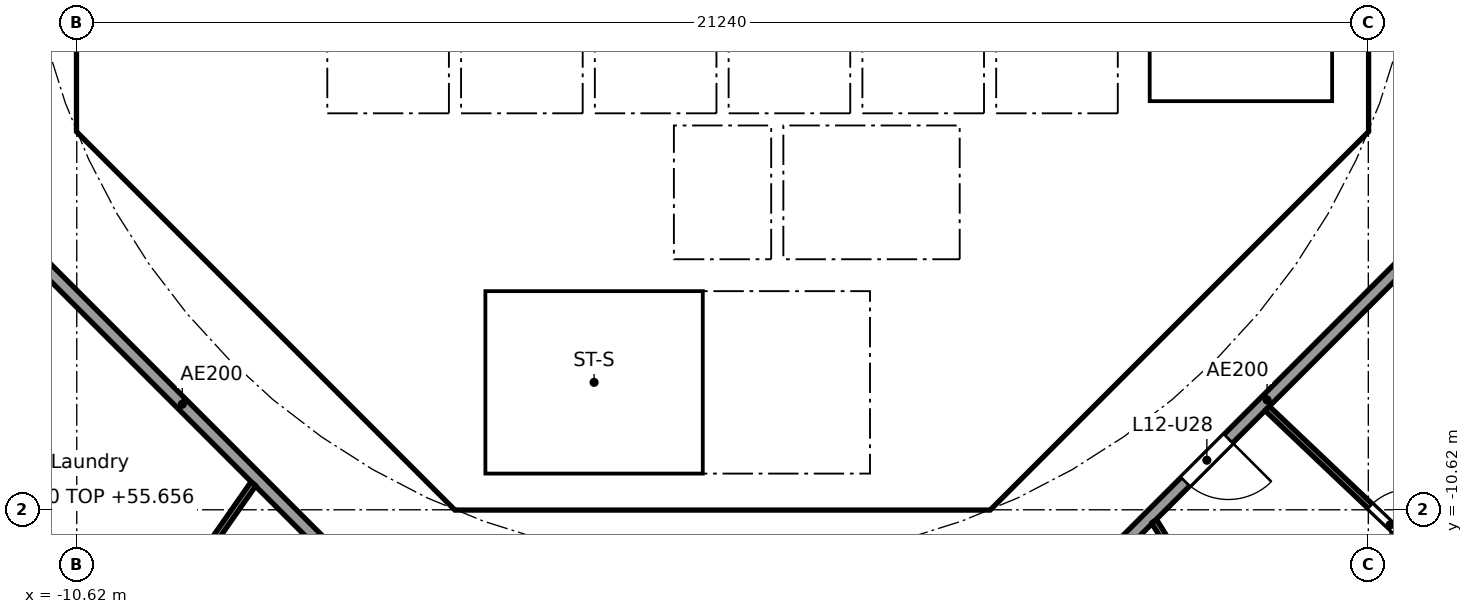
"""IFC4 building model, lengths in metres.
Left out: names, types, materials, properties, quantities, classifications, styles, units other than length and angle.
Written with IfcOpenShell. Run it as: python <this file> out.ifc"""

import sys

from ifc_helpers import new_model, si_unit, direction, frame, frame_2d, origin, place, context, subcontext, project, spatial, polyline, rectangle, outline, extrude, element, fill, save


model = new_model("IFC4")
c1 = context("Model", 3, precision=1e-05, world=origin(), true_north=direction((0.0, 1.0)))
c2 = subcontext(c1, "Body", "Model", "MODEL_VIEW")
j1 = project(units=[si_unit("LENGTHUNIT", "METRE"), si_unit("PLANEANGLEUNIT", "RADIAN")], contexts=[c1])
p1 = place(None, origin())
s1 = spatial("IfcSite", under=j1, at=p1, CompositionType="ELEMENT")
p2 = place(p1, origin())
s2 = spatial("IfcBuilding", under=s1, at=p2, CompositionType="ELEMENT")
p3 = place(p2, frame((0.0, 0.0, 52.9)))
s3 = spatial("IfcBuildingStorey", under=s2, at=p3, CompositionType="ELEMENT", Elevation=52.9)
p4 = place(p3, frame((-10.325, 3.801, 0.0), z_axis=(0.0, 0.0, 1.0), x_axis=(0.0, -1.0, 0.0)))
e1 = element("IfcWall", 1, at=p4, inside=s3, PredefinedType="SHEAR", context=c2, shape_type="SweptSolid", body=[
    extrude(rectangle(XDim=7.602, YDim=0.6, at=frame_2d((3.801, 0.0))), origin(), (0.0, 0.0, 1.0), 3.44),
])
p5 = place(p4, frame((0.651, 0.0, 0.0)))
e2 = element("IfcOpeningElement", 2, at=p5, cuts=e1, PredefinedType="OPENING", context=c2, shape_type="SweptSolid", body=[
    extrude(rectangle(XDim=1.5, YDim=2.1, at=frame_2d((0.75, 1.05))), frame((0.0, 0.31, 0.0), z_axis=(0.0, -1.0, 0.0), x_axis=(1.0, 0.0, 0.0)), (0.0, 0.0, 1.0), 0.62),
])
p6 = place(p4, frame((5.451, 0.0, 0.0)))
e3 = element("IfcOpeningElement", 3, at=p6, cuts=e1, PredefinedType="OPENING", context=c2, shape_type="SweptSolid", body=[
    extrude(rectangle(XDim=1.5, YDim=2.1, at=frame_2d((0.75, 1.05))), frame((0.0, 0.31, 0.0), z_axis=(0.0, -1.0, 0.0), x_axis=(1.0, 0.0, 0.0)), (0.0, 0.0, 1.0), 0.62),
])
p7 = place(p3, frame((-9.988, -4.613, 0.0), z_axis=(0.0, 0.0, 1.0), x_axis=(0.707106781187, -0.707106781187, 0.0)))
e4 = element("IfcWall", 4, at=p7, inside=s3, PredefinedType="SHEAR", context=c2, shape_type="SweptSolid", body=[
    extrude(rectangle(XDim=7.602, YDim=0.6, at=frame_2d((3.801, 0.0))), origin(), (0.0, 0.0, 1.0), 3.44),
])
p8 = place(p7, frame((6.151, 0.0, 0.0)))
e5 = element("IfcOpeningElement", 5, at=p8, cuts=e4, PredefinedType="OPENING", context=c2, shape_type="SweptSolid", body=[
    extrude(rectangle(XDim=1.1, YDim=2.1, at=frame_2d((0.55, 1.05))), frame((0.0, 0.31, 0.0), z_axis=(0.0, -1.0, 0.0), x_axis=(1.0, 0.0, 0.0)), (0.0, 0.0, 1.0), 0.62),
])
p9 = place(p3, frame((4.613, -9.988, 0.0), z_axis=(0.0, 0.0, 1.0), x_axis=(0.707106781187, 0.707106781187, 0.0)))
e6 = element("IfcWall", 6, at=p9, inside=s3, PredefinedType="SHEAR", context=c2, shape_type="SweptSolid", body=[
    extrude(rectangle(XDim=7.602, YDim=0.6, at=frame_2d((3.801, 0.0))), origin(), (0.0, 0.0, 1.0), 3.44),
])
p10 = place(p9, frame((3.201, 0.0, 0.0)))
e7 = element("IfcOpeningElement", 7, at=p10, cuts=e6, PredefinedType="OPENING", context=c2, shape_type="SweptSolid", body=[
    extrude(rectangle(XDim=1.2, YDim=2.1, at=frame_2d((0.6, 1.05))), frame((0.0, 0.31, 0.0), z_axis=(0.0, -1.0, 0.0), x_axis=(1.0, 0.0, 0.0)), (0.0, 0.0, 1.0), 0.62),
])
p11 = place(p3, frame((4.0, -10.025, 0.0), z_axis=(0.0, 0.0, 1.0), x_axis=(0.0, 1.0, 0.0)))
e8 = element("IfcWall", 8, at=p11, inside=s3, PredefinedType="SOLIDWALL", context=c2, shape_type="SweptSolid", body=[
    extrude(rectangle(XDim=3.0, YDim=0.2, at=frame_2d((1.5, 0.0))), origin(), (0.0, 0.0, 1.0), 3.44),
])
p12 = place(p11, frame((0.975, 0.0, 0.0)))
e9 = element("IfcOpeningElement", 9, at=p12, cuts=e8, PredefinedType="OPENING", context=c2, shape_type="SweptSolid", body=[
    extrude(rectangle(XDim=1.1, YDim=2.1, at=frame_2d((0.55, 1.05))), frame((0.0, 0.11, 0.0), z_axis=(0.0, -1.0, 0.0), x_axis=(1.0, 0.0, 0.0)), (0.0, 0.0, 1.0), 0.22),
])
p13 = place(p3, frame((-6.2, -7.827, 0.0), z_axis=(0.0, 0.0, 1.0), x_axis=(0.0, 1.0, 0.0)))
e10 = element("IfcWall", 10, at=p13, inside=s3, PredefinedType="PARTITIONING", context=c2, shape_type="SweptSolid", body=[
    extrude(rectangle(XDim=3.527, YDim=0.15, at=frame_2d((1.763, 0.0))), origin(), (0.0, 0.0, 1.0), 3.44),
])
p14 = place(p13, frame((1.276, 0.0, 0.0)))
e11 = element("IfcOpeningElement", 11, at=p14, cuts=e10, PredefinedType="OPENING", context=c2, shape_type="SweptSolid", body=[
    extrude(rectangle(XDim=0.9, YDim=2.1, at=frame_2d((0.45, 1.05))), frame((0.0, 0.085, 0.0), z_axis=(0.0, -1.0, 0.0), x_axis=(1.0, 0.0, 0.0)), (0.0, 0.0, 1.0), 0.17),
])
p15 = place(p3, frame((4.0, -6.5, 0.0), z_axis=(0.0, 0.0, 1.0), x_axis=(0.0, 1.0, 0.0)))
e12 = element("IfcWall", 12, at=p15, inside=s3, PredefinedType="SOLIDWALL", context=c2, shape_type="SweptSolid", body=[
    extrude(rectangle(XDim=2.2, YDim=0.2, at=frame_2d((1.1, 0.0))), origin(), (0.0, 0.0, 1.0), 3.44),
])
p16 = place(p15, frame((0.55, 0.0, 0.0)))
e13 = element("IfcOpeningElement", 13, at=p16, cuts=e12, PredefinedType="OPENING", context=c2, shape_type="SweptSolid", body=[
    extrude(rectangle(XDim=1.1, YDim=2.1, at=frame_2d((0.55, 1.05))), frame((0.0, 0.11, 0.0), z_axis=(0.0, -1.0, 0.0), x_axis=(1.0, 0.0, 0.0)), (0.0, 0.0, 1.0), 0.22),
])
p17 = place(p3, frame((-4.0, -6.5, 0.0), z_axis=(0.0, 0.0, 1.0), x_axis=(0.0, 1.0, 0.0)))
e14 = element("IfcWall", 14, at=p17, inside=s3, PredefinedType="SOLIDWALL", context=c2, shape_type="SweptSolid", body=[
    extrude(rectangle(XDim=2.2, YDim=0.2, at=frame_2d((1.1, 0.0))), origin(), (0.0, 0.0, 1.0), 3.44),
])
p18 = place(p17, frame((0.65, 0.0, 0.0)))
e15 = element("IfcOpeningElement", 15, at=p18, cuts=e14, PredefinedType="OPENING", context=c2, shape_type="SweptSolid", body=[
    extrude(rectangle(XDim=0.9, YDim=2.1, at=frame_2d((0.45, 1.05))), frame((0.0, 0.11, 0.0), z_axis=(0.0, -1.0, 0.0), x_axis=(1.0, 0.0, 0.0)), (0.0, 0.0, 1.0), 0.22),
])
p19 = place(p3, origin())
e16 = element("IfcWall", 16, at=p19, inside=s3, PredefinedType="SHEAR", context=c2, shape_type="SweptSolid", body=[
    extrude(outline(polyline([(-10.625, -3.801), (-10.025, -3.801), (-10.025, -4.152), (-9.776, -4.401), (-10.2, -4.825), (-10.625, -4.401), (-10.625, -3.801)])), origin(), (0.0, 0.0, 1.0), 3.44),
])
p20 = place(p3, origin())
e17 = element("IfcWall", 17, at=p20, inside=s3, PredefinedType="SHEAR", context=c2, shape_type="SweptSolid", body=[
    extrude(outline(polyline([(-4.152, -10.025), (4.152, -10.025), (4.401, -9.776), (4.825, -10.2), (4.401, -10.625), (-4.401, -10.625), (-4.825, -10.2), (-4.401, -9.776), (-4.152, -10.025)])), origin(), (0.0, 0.0, 1.0), 3.44),
])
p21 = place(p3, origin())
e18 = element("IfcWall", 18, at=p21, inside=s3, PredefinedType="SHEAR", context=c2, shape_type="SweptSolid", body=[
    extrude(outline(polyline([(9.776, -4.401), (10.025, -4.152), (10.025, -3.801), (10.025, 4.152), (9.776, 4.401), (10.2, 4.825), (10.625, 4.401), (10.625, -4.401), (10.2, -4.825), (9.776, -4.401)])), origin(), (0.0, 0.0, 1.0), 3.44),
])
for number, where, z_axis, x_axis in (
    (19, (-0.9, -6.5, 0.0), (0.0, 0.0, 1.0), (0.0, 1.0, 0.0)),
    (20, (0.9, -6.5, 0.0), (0.0, 0.0, 1.0), (0.0, 1.0, 0.0)),
):
    element("IfcWall", number, at=place(p3, frame(where, z_axis=z_axis, x_axis=x_axis)), inside=s3, PredefinedType="SOLIDWALL", context=c2, shape_type="SweptSolid", body=[
        extrude(rectangle(XDim=2.2, YDim=0.2, at=frame_2d((1.1, 0.0))), origin(), (0.0, 0.0, 1.0), 3.44),
    ])
p22 = place(p3, origin())
e21 = element("IfcWall", 21, at=p22, inside=s3, PredefinedType="SOLIDWALL", context=c2, shape_type="SweptSolid", body=[
    extrude(outline(polyline([(-6.7, -2.1), (-6.5, -2.1), (-6.5, -4.1), (-4.5, -4.1), (-4.5, -2.1), (-4.3, -2.1), (-4.3, -4.1), (-2.3, -4.1), (-2.3, -2.1), (-2.1, -2.1), (-2.1, -4.1), (-0.1, -4.1), (-0.1, -2.1), (0.1, -2.1), (0.1, -4.1), (2.1, -4.1), (2.1, -2.1), (2.3, -2.1), (2.3, -4.1), (4.3, -4.1), (4.3, -2.1), (4.5, -2.1), (4.5, -4.1), (6.5, -4.1), (6.5, -2.1), (6.7, -2.1), (6.7, -4.3), (-6.7, -4.3), (-6.7, -2.1)])), origin(), (0.0, 0.0, 1.0), 3.44),
])
p23 = place(p3, frame((-10.025, -4.0, 0.0), z_axis=(0.0, 0.0, 1.0), x_axis=(1.0, 0.0, 0.0)))
e22 = element("IfcWall", 22, at=p23, inside=s3, PredefinedType="PARTITIONING", context=c2, shape_type="SweptSolid", body=[
    extrude(rectangle(XDim=3.325, YDim=0.2, at=frame_2d((1.662, 0.0))), origin(), (0.0, 0.0, 1.0), 3.44),
])
p24 = place(p3, origin())
e23 = element("IfcWall", 23, at=p24, inside=s3, PredefinedType="SOLIDWALL", context=c2, shape_type="SweptSolid", body=[
    extrude(outline(polyline([(-3.9, -10.025), (-4.1, -10.025), (-4.1, -7.025), (-3.9, -7.025), (-3.9, -10.025)])), origin(), (0.0, 0.0, 1.0), 3.44),
])
p25 = place(p3, origin())
e24 = element("IfcWall", 24, at=p25, inside=s3, PredefinedType="SOLIDWALL", context=c2, shape_type="SweptSolid", body=[
    extrude(outline(polyline([(4.1, -7.025), (-4.1, -7.025), (-4.1, -6.5), (4.1, -6.5), (4.1, -7.025)])), origin(), (0.0, 0.0, 1.0), 3.44),
])
p26 = place(p3, origin())
e25 = element("IfcWall", 25, at=p26, inside=s3, PredefinedType="SOLIDWALL", context=c2, shape_type="SweptSolid", body=[
    extrude(outline(polyline([(7.025, -3.9), (6.7, -3.9), (6.7, 3.9), (7.025, 3.9), (7.025, -3.9)])), origin(), (0.0, 0.0, 1.0), 3.44),
])
p27 = place(p3, origin())
e26 = element("IfcWall", 26, at=p27, inside=s3, PredefinedType="SOLIDWALL", context=c2, shape_type="SweptSolid", body=[
    extrude(outline(polyline([(10.025, -4.1), (6.7, -4.1), (6.7, -3.9), (10.025, -3.9), (10.025, -4.1)])), origin(), (0.0, 0.0, 1.0), 3.44),
])
p28 = place(p3, frame((-12.635, -5.134, 0.0), z_axis=(0.0, 0.0, 1.0), x_axis=(0.707106781187, -0.707106781187, 0.0)))
e27 = element("IfcWall", 27, at=p28, inside=s3, PredefinedType="PARTITIONING", context=c2, shape_type="SweptSolid", body=[
    extrude(rectangle(XDim=10.609, YDim=0.2, at=frame_2d((5.305, 0.0))), origin(), (0.0, 0.0, 1.0), 3.44),
])
p29 = place(p3, frame((5.275, -12.494, 0.0), z_axis=(0.0, 0.0, 1.0), x_axis=(0.707106781187, 0.707106781187, 0.0)))
e28 = element("IfcWall", 28, at=p29, inside=s3, PredefinedType="PARTITIONING", context=c2, shape_type="SweptSolid", body=[
    extrude(rectangle(XDim=10.409, YDim=0.2, at=frame_2d((5.205, 0.0))), origin(), (0.0, 0.0, 1.0), 3.44),
])
p30 = place(p29, frame((3.303, 0.0, 0.0)))
e29 = element("IfcOpeningElement", 29, at=p30, cuts=e28, PredefinedType="OPENING", context=c2, shape_type="SweptSolid", body=[
    extrude(rectangle(XDim=1.0, YDim=2.1, at=frame_2d((0.5, 1.05))), frame((0.0, 0.11, 0.0), z_axis=(0.0, -1.0, 0.0), x_axis=(1.0, 0.0, 0.0)), (0.0, 0.0, 1.0), 0.22),
])
p31 = place(p3, frame((-13.222, -10.007, 0.0), z_axis=(0.0, 0.0, 1.0), x_axis=(0.640807748916, -0.767701393075, 0.0)))
e30 = element("IfcWall", 30, at=p31, inside=s3, PredefinedType="PARTITIONING", context=c2, shape_type="SweptSolid", body=[
    extrude(rectangle(XDim=4.737, YDim=0.1, at=frame_2d((2.368, 0.0))), origin(), (0.0, 0.0, 1.0), 2.756),
])
p32 = place(p31, frame((1.943, 0.0, 0.0)))
e31 = element("IfcOpeningElement", 31, at=p32, cuts=e30, PredefinedType="OPENING", context=c2, shape_type="SweptSolid", body=[
    extrude(rectangle(XDim=0.9, YDim=2.1, at=frame_2d((0.45, 1.05))), frame((0.0, 0.06, 0.0), z_axis=(0.0, -1.0, 0.0), x_axis=(1.0, 0.0, 0.0)), (0.0, 0.0, 1.0), 0.12),
])
p33 = place(p3, frame((-7.715, -10.193, 0.0), z_axis=(0.0, 0.0, 1.0), x_axis=(-0.573126502256, -0.819466907454, 0.0)))
e32 = element("IfcWall", 32, at=p33, inside=s3, PredefinedType="PARTITIONING", context=c2, shape_type="SweptSolid", body=[
    extrude(rectangle(XDim=9.954, YDim=0.1, at=frame_2d((4.977, 0.0))), origin(), (0.0, 0.0, 1.0), 2.687),
])
p34 = place(p3, frame((7.097, -10.81, 0.0), z_axis=(0.0, 0.0, 1.0), x_axis=(0.526453266471, -0.850204068576, 0.0)))
e33 = element("IfcWall", 33, at=p34, inside=s3, PredefinedType="PARTITIONING", context=c2, shape_type="SweptSolid", body=[
    extrude(rectangle(XDim=19.85, YDim=0.1, at=frame_2d((9.925, 0.0))), origin(), (0.0, 0.0, 1.0), 2.687),
])
p35 = place(p34, frame((0.35, 0.0, 0.0)))
e34 = element("IfcOpeningElement", 34, at=p35, cuts=e33, PredefinedType="OPENING", context=c2, shape_type="SweptSolid", body=[
    extrude(rectangle(XDim=0.9, YDim=2.1, at=frame_2d((0.45, 1.05))), frame((0.0, 0.06, 0.0), z_axis=(0.0, -1.0, 0.0), x_axis=(1.0, 0.0, 0.0)), (0.0, 0.0, 1.0), 0.12),
])
p36 = place(p34, frame((8.795, 0.0, 0.0)))
e35 = element("IfcOpeningElement", 35, at=p36, cuts=e33, PredefinedType="OPENING", context=c2, shape_type="SweptSolid", body=[
    extrude(rectangle(XDim=0.9, YDim=2.1, at=frame_2d((0.45, 1.05))), frame((0.0, 0.06, 0.0), z_axis=(0.0, -1.0, 0.0), x_axis=(1.0, 0.0, 0.0)), (0.0, 0.0, 1.0), 0.12),
])
p37 = place(p3, frame((8.957, -8.953, 0.0), z_axis=(0.0, 0.0, 1.0), x_axis=(0.725250022034, -0.688485588476, 0.0)))
e36 = element("IfcWall", 36, at=p37, inside=s3, PredefinedType="PARTITIONING", context=c2, shape_type="SweptSolid", body=[
    extrude(rectangle(XDim=12.963, YDim=0.1, at=frame_2d((6.481, 0.0))), origin(), (0.0, 0.0, 1.0), 2.687),
])
p38 = place(p37, frame((2.333, 0.0, 0.0)))
e37 = element("IfcOpeningElement", 37, at=p38, cuts=e36, PredefinedType="OPENING", context=c2, shape_type="SweptSolid", body=[
    extrude(rectangle(XDim=0.9, YDim=2.1, at=frame_2d((0.45, 1.05))), frame((0.0, 0.06, 0.0), z_axis=(0.0, -1.0, 0.0), x_axis=(1.0, 0.0, 0.0)), (0.0, 0.0, 1.0), 0.12),
])
p39 = place(p37, frame((8.79, 0.0, 0.0)))
e38 = element("IfcOpeningElement", 38, at=p39, cuts=e36, PredefinedType="OPENING", context=c2, shape_type="SweptSolid", body=[
    extrude(rectangle(XDim=0.9, YDim=2.1, at=frame_2d((0.45, 1.05))), frame((0.0, 0.06, 0.0), z_axis=(0.0, -1.0, 0.0), x_axis=(1.0, 0.0, 0.0)), (0.0, 0.0, 1.0), 0.12),
])
p40 = place(p16, origin())
e39 = element("IfcDoor", 39, at=p40, inside=s3, OperationType="DOUBLE_DOOR_SLIDING", PredefinedType="DOOR", context=c2, shape_type="SweptSolid", body=[
    extrude(rectangle(XDim=1.1, YDim=2.1, at=frame_2d((0.55, 1.05))), frame((0.0, 0.025, 0.0), z_axis=(0.0, -1.0, 0.0), x_axis=(1.0, 0.0, 0.0)), (0.0, 0.0, 1.0), 0.05),
])
fill(e13, e39)
p41 = place(p12, origin())
e40 = element("IfcDoor", 40, at=p41, inside=s3, OperationType="SINGLE_SWING_LEFT", PredefinedType="DOOR", context=c2, shape_type="SweptSolid", body=[
    extrude(rectangle(XDim=1.1, YDim=2.1, at=frame_2d((0.55, 1.05))), frame((0.0, 0.025, 0.0), z_axis=(0.0, -1.0, 0.0), x_axis=(1.0, 0.0, 0.0)), (0.0, 0.0, 1.0), 0.05),
])
fill(e9, e40)
p42 = place(p14, origin())
e41 = element("IfcDoor", 41, at=p42, inside=s3, OperationType="SINGLE_SWING_LEFT", PredefinedType="DOOR", context=c2, shape_type="SweptSolid", body=[
    extrude(rectangle(XDim=0.9, YDim=2.1, at=frame_2d((0.45, 1.05))), frame((0.0, 0.025, 0.0), z_axis=(0.0, -1.0, 0.0), x_axis=(1.0, 0.0, 0.0)), (0.0, 0.0, 1.0), 0.05),
])
fill(e11, e41)
p43 = place(p18, frame((0.9, 0.0, 0.0), x_axis=(-1.0, 0.0, 0.0)))
e42 = element("IfcDoor", 42, at=p43, inside=s3, OperationType="SINGLE_SWING_LEFT", PredefinedType="DOOR", context=c2, shape_type="SweptSolid", body=[
    extrude(rectangle(XDim=0.9, YDim=2.1, at=frame_2d((0.45, 1.05))), frame((0.0, 0.025, 0.0), z_axis=(0.0, -1.0, 0.0), x_axis=(1.0, 0.0, 0.0)), (0.0, 0.0, 1.0), 0.05),
])
fill(e15, e42)
p44 = place(p10, origin())
e43 = element("IfcDoor", 43, at=p44, inside=s3, OperationType="SINGLE_SWING_LEFT", PredefinedType="DOOR", context=c2, shape_type="SweptSolid", body=[
    extrude(rectangle(XDim=1.2, YDim=2.1, at=frame_2d((0.6, 1.05))), frame((0.0, 0.025, 0.0), z_axis=(0.0, -1.0, 0.0), x_axis=(1.0, 0.0, 0.0)), (0.0, 0.0, 1.0), 0.05),
])
fill(e7, e43)
p45 = place(p6, origin())
e44 = element("IfcDoor", 44, at=p45, inside=s3, OperationType="DOUBLE_DOOR_SINGLE_SWING", PredefinedType="DOOR", context=c2, shape_type="SweptSolid", body=[
    extrude(rectangle(XDim=1.5, YDim=2.1, at=frame_2d((0.75, 1.05))), frame((0.0, 0.025, 0.0), z_axis=(0.0, -1.0, 0.0), x_axis=(1.0, 0.0, 0.0)), (0.0, 0.0, 1.0), 0.05),
])
fill(e3, e44)
p46 = place(p8, origin())
e45 = element("IfcDoor", 45, at=p46, inside=s3, OperationType="SINGLE_SWING_LEFT", PredefinedType="DOOR", context=c2, shape_type="SweptSolid", body=[
    extrude(rectangle(XDim=1.1, YDim=2.1, at=frame_2d((0.55, 1.05))), frame((0.0, 0.025, 0.0), z_axis=(0.0, -1.0, 0.0), x_axis=(1.0, 0.0, 0.0)), (0.0, 0.0, 1.0), 0.05),
])
fill(e5, e45)
p47 = place(p30, frame((1.0, 0.0, 0.0), x_axis=(-1.0, 0.0, 0.0)))
e46 = element("IfcDoor", 46, at=p47, inside=s3, OperationType="SINGLE_SWING_LEFT", PredefinedType="DOOR", context=c2, shape_type="SweptSolid", body=[
    extrude(rectangle(XDim=1.0, YDim=2.1, at=frame_2d((0.5, 1.05))), frame((0.0, 0.025, 0.0), z_axis=(0.0, -1.0, 0.0), x_axis=(1.0, 0.0, 0.0)), (0.0, 0.0, 1.0), 0.05),
])
fill(e29, e46)
p48 = place(p38, origin())
e47 = element("IfcDoor", 47, at=p48, inside=s3, OperationType="SINGLE_SWING_RIGHT", PredefinedType="DOOR", context=c2, shape_type="SweptSolid", body=[
    extrude(rectangle(XDim=0.9, YDim=2.1, at=frame_2d((0.45, 1.05))), frame((0.0, 0.025, 0.0), z_axis=(0.0, -1.0, 0.0), x_axis=(1.0, 0.0, 0.0)), (0.0, 0.0, 1.0), 0.05),
])
fill(e37, e47)
save(model, sys.argv[1])
